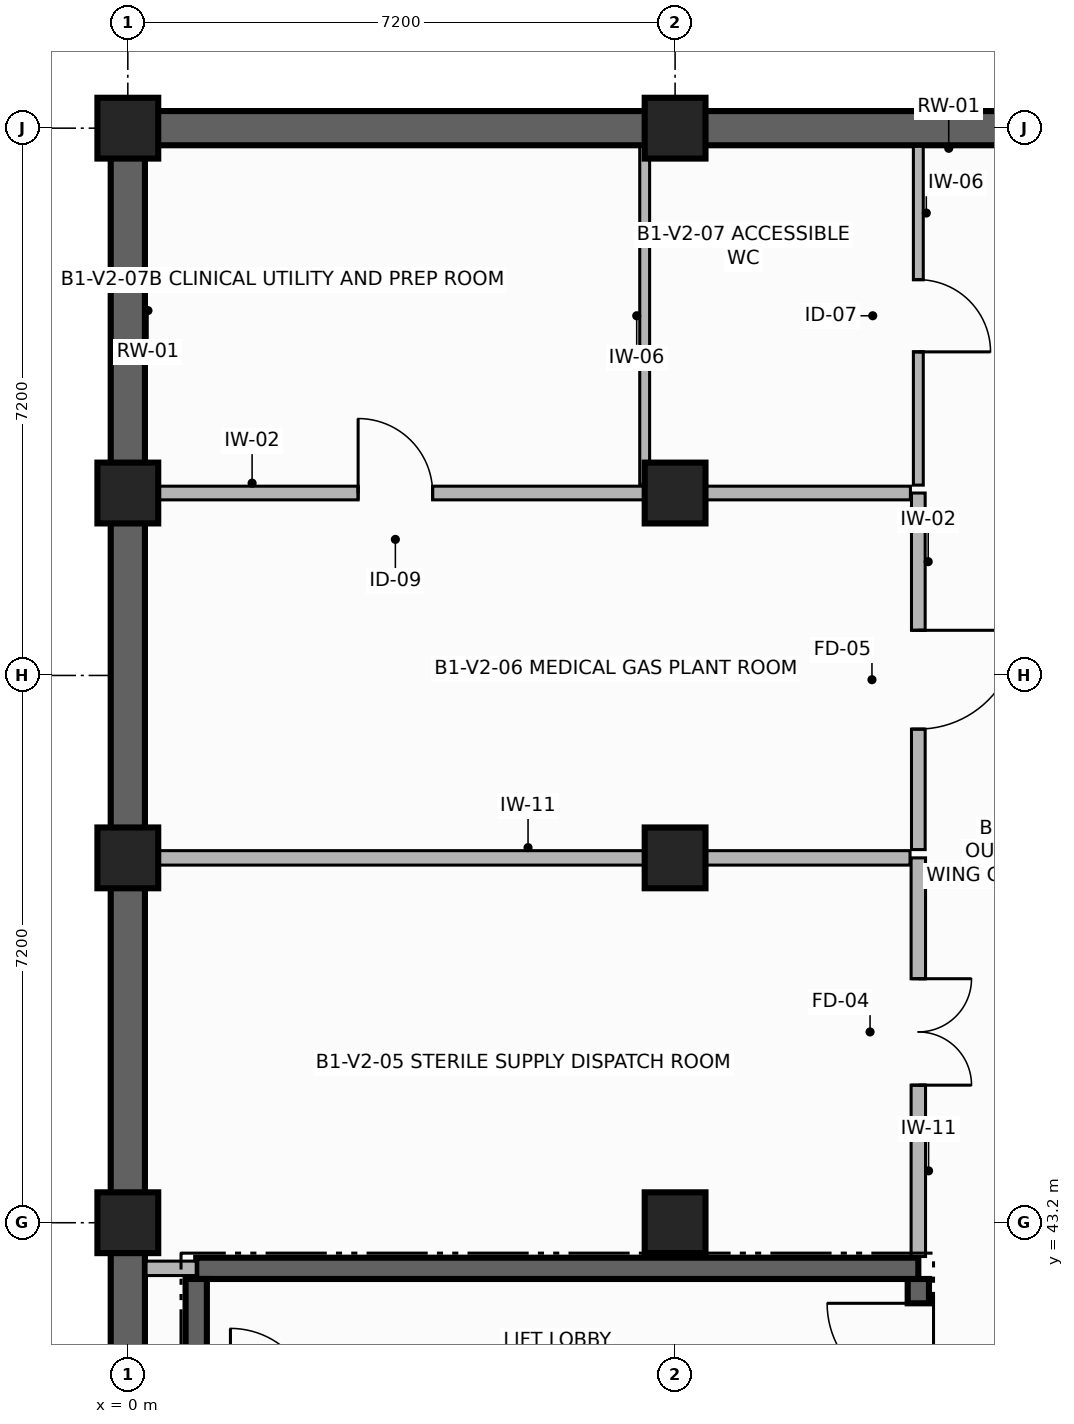
"""IFC4 building model, lengths in metres.
Left out: names, types, materials, properties, quantities, classifications, styles, units other than length and angle.
Written with IfcOpenShell. Run it as: python <this file> out.ifc"""

import sys

from ifc_helpers import new_model, si_unit, direction, frame, frame_2d, origin, origin_2d, place, context, subcontext, project, spatial, rectangle, extrude, element, fill, save


model = new_model("IFC4")
c1 = context("Model", 3, precision=1e-05, world=origin(), true_north=direction((0.0, 1.0)))
c2 = subcontext(c1, "Body", "Model", "MODEL_VIEW")
j1 = project(units=[si_unit("LENGTHUNIT", "METRE"), si_unit("PLANEANGLEUNIT", "RADIAN")], contexts=[c1])
p1 = place(None, origin())
s1 = spatial("IfcSite", under=j1, at=p1, CompositionType="ELEMENT")
p2 = place(p1, origin())
s2 = spatial("IfcBuilding", under=s1, at=p2, CompositionType="ELEMENT")
p3 = place(p2, frame((0.0, 0.0, -4.2)))
s3 = spatial("IfcBuildingStorey", under=s2, at=p3, CompositionType="ELEMENT", Elevation=-4.2)
for number, where, z_axis, x_axis in (
    (1, (0.0, 43.2, -0.4), (0.0, 0.0, 1.0), (1.0, 0.0, 0.0)),
    (2, (0.0, 48.0, -0.4), (0.0, 0.0, 1.0), (1.0, 0.0, 0.0)),
    (3, (0.0, 52.8, -0.4), (0.0, 0.0, 1.0), (1.0, 0.0, 0.0)),
    (4, (0.0, 57.6, -0.4), (0.0, 0.0, 1.0), (1.0, 0.0, 0.0)),
    (5, (7.2, 43.2, -0.4), (0.0, 0.0, 1.0), (1.0, 0.0, 0.0)),
    (6, (7.2, 48.0, -0.4), (0.0, 0.0, 1.0), (1.0, 0.0, 0.0)),
    (7, (7.2, 52.8, -0.4), (0.0, 0.0, 1.0), (1.0, 0.0, 0.0)),
    (8, (7.2, 57.6, -0.4), (0.0, 0.0, 1.0), (1.0, 0.0, 0.0)),
):
    element("IfcColumn", number, at=place(p3, frame(where, z_axis=z_axis, x_axis=x_axis)), inside=s3, PredefinedType="COLUMN", context=c2, shape_type="SweptSolid", body=[
        extrude(rectangle(XDim=0.8, YDim=0.8, at=origin_2d()), origin(), (0.0, 0.0, 1.0), 4.32),
    ])
for number, where, z_axis, x_axis in (
    (9, (14.4, 57.6, 0.0), (0.0, 0.0, 1.0), (-1.0, 0.0, 0.0)),
    (10, (7.2, 57.6, 0.0), (0.0, 0.0, 1.0), (-1.0, 0.0, 0.0)),
):
    element("IfcWall", number, at=place(p3, frame(where, z_axis=z_axis, x_axis=x_axis)), inside=s3, PredefinedType="ELEMENTEDWALL", context=c2, shape_type="SweptSolid", body=[
        extrude(rectangle(XDim=7.2, YDim=0.45, at=frame_2d((3.6, 0.0))), origin(), (0.0, 0.0, 1.0), 3.32),
    ])
for number, where, z_axis, x_axis in (
    (11, (0.0, 57.6, 0.0), (0.0, 0.0, 1.0), (0.0, -1.0, 0.0)),
    (12, (0.0, 52.8, 0.0), (0.0, 0.0, 1.0), (0.0, -1.0, 0.0)),
    (13, (0.0, 48.0, 0.0), (0.0, 0.0, 1.0), (0.0, -1.0, 0.0)),
):
    element("IfcWall", number, at=place(p3, frame(where, z_axis=z_axis, x_axis=x_axis)), inside=s3, PredefinedType="ELEMENTEDWALL", context=c2, shape_type="SweptSolid", body=[
        extrude(rectangle(XDim=4.8, YDim=0.45, at=frame_2d((2.4, 0.0))), origin(), (0.0, 0.0, 1.0), 3.32),
    ])
p4 = place(p3, frame((0.0, 43.2, 0.0), z_axis=(0.0, 0.0, 1.0), x_axis=(0.0, -1.0, 0.0)))
e14 = element("IfcWall", 14, at=p4, inside=s3, PredefinedType="ELEMENTEDWALL", context=c2, shape_type="SweptSolid", body=[
    extrude(rectangle(XDim=7.2, YDim=0.45, at=frame_2d((3.6, 0.0))), origin(), (0.0, 0.0, 1.0), 3.32),
])
p5 = place(p3, frame((10.4, 36.94, 0.0), z_axis=(0.0, 0.0, 1.0), x_axis=(0.0, 1.0, 0.0)))
e15 = element("IfcWall", 15, at=p5, inside=s3, PredefinedType="SHEAR", context=c2, shape_type="SweptSolid", body=[
    extrude(rectangle(XDim=5.52, YDim=0.28, at=frame_2d((2.76, 0.0))), origin(), (0.0, 0.0, 1.0), 3.9),
])
p6 = place(p5, frame((4.0, 0.0, 0.0)))
e16 = element("IfcOpeningElement", 16, at=p6, cuts=e15, PredefinedType="OPENING", context=c2, shape_type="SweptSolid", body=[
    extrude(rectangle(XDim=1.2, YDim=2.25, at=frame_2d((0.6, 1.125))), frame((0.0, 0.15, 0.0), z_axis=(0.0, -1.0, 0.0), x_axis=(1.0, 0.0, 0.0)), (0.0, 0.0, 1.0), 0.3),
])
p7 = place(p3, frame((10.4, 42.6, 0.0), z_axis=(0.0, 0.0, 1.0), x_axis=(-1.0, 0.0, 0.0)))
e17 = element("IfcWall", 17, at=p7, inside=s3, PredefinedType="SHEAR", context=c2, shape_type="SweptSolid", body=[
    extrude(rectangle(XDim=9.5, YDim=0.28, at=frame_2d((4.75, 0.0))), origin(), (0.0, 0.0, 1.0), 3.9),
])
p8 = place(p3, frame((0.9, 42.46, 0.0), z_axis=(0.0, 0.0, 1.0), x_axis=(0.0, -1.0, 0.0)))
e18 = element("IfcWall", 18, at=p8, inside=s3, PredefinedType="SHEAR", context=c2, shape_type="SweptSolid", body=[
    extrude(rectangle(XDim=5.52, YDim=0.28, at=frame_2d((2.76, 0.0))), origin(), (0.0, 0.0, 1.0), 3.9),
])
p9 = place(p3, frame((10.4, 48.0, 0.0), z_axis=(0.0, 0.0, 1.0), x_axis=(0.0, -1.0, 0.0)))
e19 = element("IfcWall", 19, at=p9, inside=s3, PredefinedType="PARTITIONING", context=c2, shape_type="SweptSolid", body=[
    extrude(rectangle(XDim=5.245, YDim=0.19, at=frame_2d((2.623, 0.0))), origin(), (0.0, 0.0, 1.0), 3.26),
])
p10 = place(p9, frame((1.59, 0.0, 0.0)))
e20 = element("IfcOpeningElement", 20, at=p10, cuts=e19, PredefinedType="OPENING", context=c2, shape_type="SweptSolid", body=[
    extrude(rectangle(XDim=1.4, YDim=2.25, at=frame_2d((0.7, 1.125))), frame((0.0, 0.105, 0.0), z_axis=(0.0, -1.0, 0.0), x_axis=(1.0, 0.0, 0.0)), (0.0, 0.0, 1.0), 0.21),
])
p11 = place(p3, frame((0.9, 42.6, 0.0), z_axis=(0.0, 0.0, 1.0), x_axis=(-1.0, 0.0, 0.0)))
e21 = element("IfcWall", 21, at=p11, inside=s3, PredefinedType="PARTITIONING", context=c2, shape_type="SweptSolid", body=[
    extrude(rectangle(XDim=0.66, YDim=0.19, at=frame_2d((0.33, 0.0))), origin(), (0.0, 0.0, 1.0), 3.26),
])
p12 = place(p3, frame((0.24, 48.0, 0.0), z_axis=(0.0, 0.0, 1.0), x_axis=(1.0, 0.0, 0.0)))
e22 = element("IfcWall", 22, at=p12, inside=s3, PredefinedType="PARTITIONING", context=c2, shape_type="SweptSolid", body=[
    extrude(rectangle(XDim=10.051, YDim=0.19, at=frame_2d((5.025, 0.0))), origin(), (0.0, 0.0, 1.0), 3.26),
])
p13 = place(p3, frame((10.4, 52.8, 0.0), z_axis=(0.0, 0.0, 1.0), x_axis=(0.0, -1.0, 0.0)))
e23 = element("IfcWall", 23, at=p13, inside=s3, PredefinedType="PARTITIONING", context=c2, shape_type="SweptSolid", body=[
    extrude(rectangle(XDim=4.691, YDim=0.18, at=frame_2d((2.346, 0.0))), origin(), (0.0, 0.0, 1.0), 3.26),
])
p14 = place(p13, frame((1.806, 0.0, 0.0)))
e24 = element("IfcOpeningElement", 24, at=p14, cuts=e23, PredefinedType="OPENING", context=c2, shape_type="SweptSolid", body=[
    extrude(rectangle(XDim=1.3, YDim=2.2, at=frame_2d((0.65, 1.1))), frame((0.0, 0.1, 0.0), z_axis=(0.0, -1.0, 0.0), x_axis=(1.0, 0.0, 0.0)), (0.0, 0.0, 1.0), 0.2),
])
p15 = place(p3, frame((0.24, 52.8, 0.0), z_axis=(0.0, 0.0, 1.0), x_axis=(1.0, 0.0, 0.0)))
e25 = element("IfcWall", 25, at=p15, inside=s3, PredefinedType="PARTITIONING", context=c2, shape_type="SweptSolid", body=[
    extrude(rectangle(XDim=6.56, YDim=0.18, at=frame_2d((3.28, 0.0))), origin(), (0.0, 0.0, 1.0), 3.26),
])
p16 = place(p15, frame((2.79, 0.0, 0.0)))
e26 = element("IfcOpeningElement", 26, at=p16, cuts=e25, PredefinedType="OPENING", context=c2, shape_type="SweptSolid", body=[
    extrude(rectangle(XDim=0.98, YDim=2.15, at=frame_2d((0.49, 1.075))), frame((0.0, 0.1, 0.0), z_axis=(0.0, -1.0, 0.0), x_axis=(1.0, 0.0, 0.0)), (0.0, 0.0, 1.0), 0.2),
])
p17 = place(p3, frame((6.812, 52.8, 0.0), z_axis=(0.0, 0.0, 1.0), x_axis=(1.0, 0.0, 0.0)))
e27 = element("IfcWall", 27, at=p17, inside=s3, PredefinedType="PARTITIONING", context=c2, shape_type="SweptSolid", body=[
    extrude(rectangle(XDim=3.484, YDim=0.18, at=frame_2d((1.742, 0.0))), origin(), (0.0, 0.0, 1.0), 3.26),
])
p18 = place(p3, frame((6.8, 52.904, 0.0), z_axis=(0.0, 0.0, 1.0), x_axis=(0.0, 1.0, 0.0)))
e28 = element("IfcWall", 28, at=p18, inside=s3, PredefinedType="PARTITIONING", context=c2, shape_type="SweptSolid", body=[
    extrude(rectangle(XDim=4.456, YDim=0.13, at=frame_2d((2.228, 0.0))), origin(), (0.0, 0.0, 1.0), 3.26),
])
p19 = place(p3, frame((10.4, 57.36, 0.0), z_axis=(0.0, 0.0, 1.0), x_axis=(0.0, -1.0, 0.0)))
e29 = element("IfcWall", 29, at=p19, inside=s3, PredefinedType="PARTITIONING", context=c2, shape_type="SweptSolid", body=[
    extrude(rectangle(XDim=4.456, YDim=0.13, at=frame_2d((2.228, 0.0))), origin(), (0.0, 0.0, 1.0), 3.26),
])
p20 = place(p19, frame((1.753, 0.0, 0.0)))
e30 = element("IfcOpeningElement", 30, at=p20, cuts=e29, PredefinedType="OPENING", context=c2, shape_type="SweptSolid", body=[
    extrude(rectangle(XDim=0.95, YDim=2.1, at=frame_2d((0.475, 1.05))), frame((0.0, 0.075, 0.0), z_axis=(0.0, -1.0, 0.0), x_axis=(1.0, 0.0, 0.0)), (0.0, 0.0, 1.0), 0.15),
])
p21 = place(p6, origin())
e31 = element("IfcDoor", 31, at=p21, inside=s3, OperationType="SINGLE_SWING_RIGHT", PredefinedType="DOOR", context=c2, shape_type="SweptSolid", body=[
    extrude(rectangle(XDim=1.2, YDim=2.25, at=frame_2d((0.6, 1.125))), frame((0.0, 0.025, 0.0), z_axis=(0.0, -1.0, 0.0), x_axis=(1.0, 0.0, 0.0)), (0.0, 0.0, 1.0), 0.05),
])
fill(e16, e31)
p22 = place(p10, origin())
e32 = element("IfcDoor", 32, at=p22, inside=s3, OperationType="DOUBLE_DOOR_SINGLE_SWING", PredefinedType="DOOR", context=c2, shape_type="SweptSolid", body=[
    extrude(rectangle(XDim=1.4, YDim=2.25, at=frame_2d((0.7, 1.125))), frame((0.0, 0.025, 0.0), z_axis=(0.0, -1.0, 0.0), x_axis=(1.0, 0.0, 0.0)), (0.0, 0.0, 1.0), 0.05),
])
fill(e20, e32)
p23 = place(p14, origin())
e33 = element("IfcDoor", 33, at=p23, inside=s3, OperationType="SINGLE_SWING_LEFT", PredefinedType="DOOR", context=c2, shape_type="SweptSolid", body=[
    extrude(rectangle(XDim=1.3, YDim=2.2, at=frame_2d((0.65, 1.1))), frame((0.0, 0.025, 0.0), z_axis=(0.0, -1.0, 0.0), x_axis=(1.0, 0.0, 0.0)), (0.0, 0.0, 1.0), 0.05),
])
fill(e24, e33)
p24 = place(p20, origin())
e34 = element("IfcDoor", 34, at=p24, inside=s3, OperationType="SINGLE_SWING_RIGHT", PredefinedType="DOOR", context=c2, shape_type="SweptSolid", body=[
    extrude(rectangle(XDim=0.95, YDim=2.1, at=frame_2d((0.475, 1.05))), frame((0.0, 0.025, 0.0), z_axis=(0.0, -1.0, 0.0), x_axis=(1.0, 0.0, 0.0)), (0.0, 0.0, 1.0), 0.05),
])
fill(e30, e34)
p25 = place(p16, origin())
e35 = element("IfcDoor", 35, at=p25, inside=s3, OperationType="SINGLE_SWING_LEFT", PredefinedType="DOOR", context=c2, shape_type="SweptSolid", body=[
    extrude(rectangle(XDim=0.98, YDim=2.15, at=frame_2d((0.49, 1.075))), frame((0.0, 0.025, 0.0), z_axis=(0.0, -1.0, 0.0), x_axis=(1.0, 0.0, 0.0)), (0.0, 0.0, 1.0), 0.05),
])
fill(e26, e35)
save(model, sys.argv[1])
